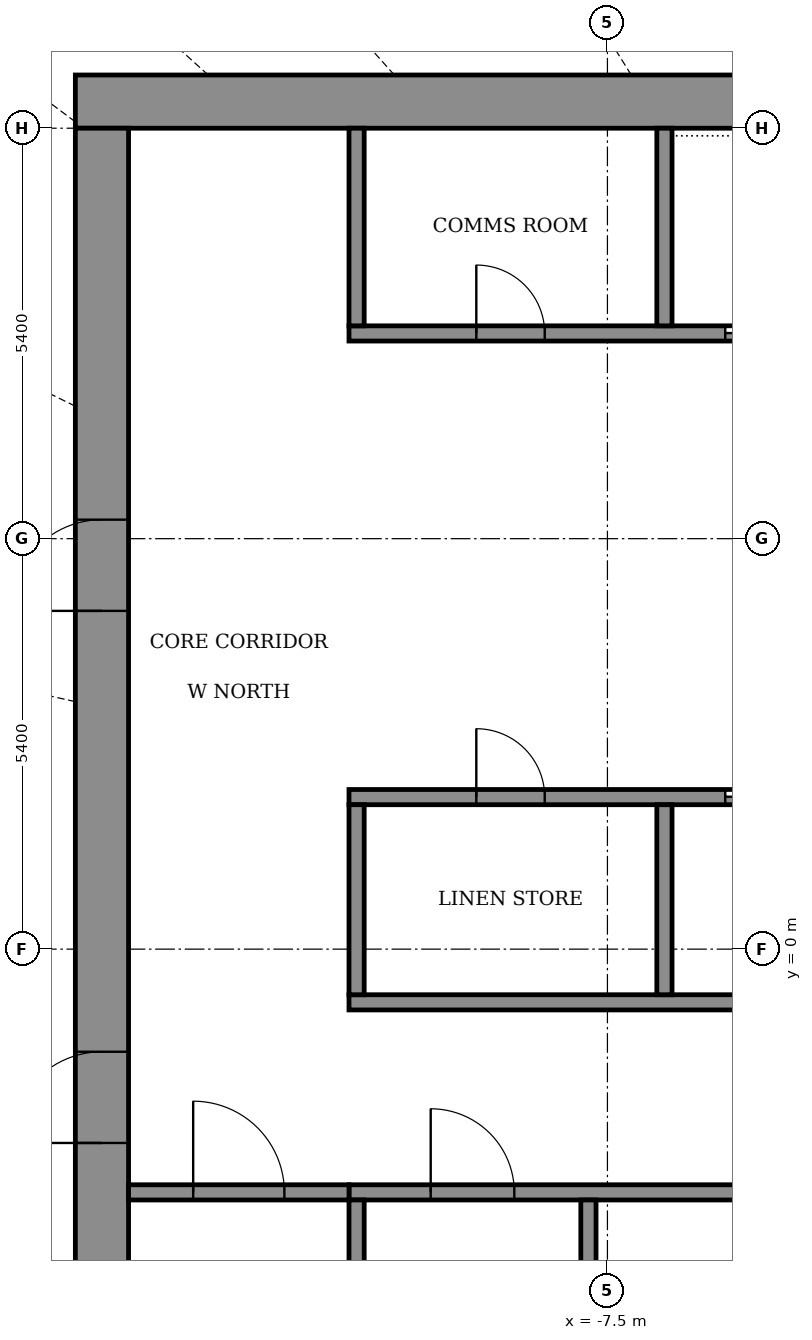
"""IFC4 building model, lengths in metres.
Left out: names, types, materials, properties, quantities, classifications, styles, units other than length and angle.
Written with IfcOpenShell. Run it as: python <this file> out.ifc"""

import sys

from ifc_helpers import new_model, si_unit, direction, frame, frame_2d, origin, place, context, subcontext, project, spatial, rectangle, extrude, element, fill, save


model = new_model("IFC4")
c1 = context("Model", 3, precision=1e-05, world=origin(), true_north=direction((0.0, 1.0)))
c2 = subcontext(c1, "Body", "Model", "MODEL_VIEW")
j1 = project(units=[si_unit("LENGTHUNIT", "METRE"), si_unit("PLANEANGLEUNIT", "RADIAN")], contexts=[c1])
p1 = place(None, origin())
s1 = spatial("IfcSite", under=j1, at=p1, CompositionType="ELEMENT")
p2 = place(p1, origin())
s2 = spatial("IfcBuilding", under=s1, at=p2, CompositionType="ELEMENT")
p3 = place(p2, frame((0.0, 0.0, 252.7)))
s3 = spatial("IfcBuildingStorey", under=s2, at=p3, CompositionType="ELEMENT", Elevation=252.7)
p4 = place(p3, frame((-14.5, 11.15, 0.0), z_axis=(0.0, 0.0, 1.0), x_axis=(1.0, 0.0, 0.0)))
e1 = element("IfcWall", 1, at=p4, inside=s3, PredefinedType="SHEAR", context=c2, shape_type="SweptSolid", body=[
    extrude(rectangle(XDim=29.0, YDim=0.7, at=frame_2d((14.5, 0.0))), origin(), (0.0, 0.0, 1.0), 4.6),
])
p5 = place(p3, frame((-14.15, -10.8, 0.0), z_axis=(0.0, 0.0, 1.0), x_axis=(0.0, 1.0, 0.0)))
e2 = element("IfcWall", 2, at=p5, inside=s3, PredefinedType="SHEAR", context=c2, shape_type="SweptSolid", body=[
    extrude(rectangle(XDim=21.6, YDim=0.7, at=frame_2d((10.8, 0.0))), origin(), (0.0, 0.0, 1.0), 4.6),
])
p6 = place(p5, frame((8.25, 0.0, 0.0)))
e3 = element("IfcOpeningElement", 3, at=p6, cuts=e2, PredefinedType="OPENING", context=c2, shape_type="SweptSolid", body=[
    extrude(rectangle(XDim=1.2, YDim=2.1, at=frame_2d((0.6, 1.05))), frame((0.0, 0.36, 0.0), z_axis=(0.0, -1.0, 0.0), x_axis=(1.0, 0.0, 0.0)), (0.0, 0.0, 1.0), 0.72),
])
p7 = place(p5, frame((15.25, 0.0, 0.0)))
e4 = element("IfcOpeningElement", 4, at=p7, cuts=e2, PredefinedType="OPENING", context=c2, shape_type="SweptSolid", body=[
    extrude(rectangle(XDim=1.2, YDim=2.1, at=frame_2d((0.6, 1.05))), frame((0.0, 0.36, 0.0), z_axis=(0.0, -1.0, 0.0), x_axis=(1.0, 0.0, 0.0)), (0.0, 0.0, 1.0), 0.72),
])
p8 = place(p3, frame((-10.9, -3.2, 0.0), z_axis=(0.0, 0.0, 1.0), x_axis=(1.0, 0.0, 0.0)))
e5 = element("IfcWall", 5, at=p8, inside=s3, PredefinedType="SHEAR", context=c2, shape_type="SweptSolid", body=[
    extrude(rectangle(XDim=21.8, YDim=0.2, at=frame_2d((10.9, 0.0))), origin(), (0.0, 0.0, 1.0), 4.05),
])
p9 = place(p8, frame((1.075, 0.0, 0.0)))
e6 = element("IfcOpeningElement", 6, at=p9, cuts=e5, PredefinedType="OPENING", context=c2, shape_type="SweptSolid", body=[
    extrude(rectangle(XDim=1.1, YDim=2.1, at=frame_2d((0.55, 1.05))), frame((0.0, 0.11, 0.0), z_axis=(0.0, -1.0, 0.0), x_axis=(1.0, 0.0, 0.0)), (0.0, 0.0, 1.0), 0.22),
])
p10 = place(p8, frame((10.325, 0.0, 0.0)))
e7 = element("IfcOpeningElement", 7, at=p10, cuts=e5, PredefinedType="OPENING", context=c2, shape_type="SweptSolid", body=[
    extrude(rectangle(XDim=1.1, YDim=2.1, at=frame_2d((0.55, 1.05))), frame((0.0, 0.11, 0.0), z_axis=(0.0, -1.0, 0.0), x_axis=(1.0, 0.0, 0.0)), (0.0, 0.0, 1.0), 0.22),
])
p11 = place(p8, frame((19.625, 0.0, 0.0)))
e8 = element("IfcOpeningElement", 8, at=p11, cuts=e5, PredefinedType="OPENING", context=c2, shape_type="SweptSolid", body=[
    extrude(rectangle(XDim=1.1, YDim=2.1, at=frame_2d((0.55, 1.05))), frame((0.0, 0.11, 0.0), z_axis=(0.0, -1.0, 0.0), x_axis=(1.0, 0.0, 0.0)), (0.0, 0.0, 1.0), 0.22),
])
p12 = place(p8, frame((5.7, 0.0, 0.0)))
e9 = element("IfcOpeningElement", 9, at=p12, cuts=e5, PredefinedType="OPENING", context=c2, shape_type="SweptSolid", body=[
    extrude(rectangle(XDim=1.1, YDim=2.1, at=frame_2d((0.55, 1.05))), frame((0.0, 0.11, 0.0), z_axis=(0.0, -1.0, 0.0), x_axis=(1.0, 0.0, 0.0)), (0.0, 0.0, 1.0), 0.22),
])
p13 = place(p8, frame((14.975, 0.0, 0.0)))
e10 = element("IfcOpeningElement", 10, at=p13, cuts=e5, PredefinedType="OPENING", context=c2, shape_type="SweptSolid", body=[
    extrude(rectangle(XDim=1.1, YDim=2.1, at=frame_2d((0.55, 1.05))), frame((0.0, 0.11, 0.0), z_axis=(0.0, -1.0, 0.0), x_axis=(1.0, 0.0, 0.0)), (0.0, 0.0, 1.0), 0.22),
])
p14 = place(p3, frame((-10.9, -0.7, 0.0), z_axis=(0.0, 0.0, 1.0), x_axis=(1.0, 0.0, 0.0)))
e11 = element("IfcWall", 11, at=p14, inside=s3, PredefinedType="SHEAR", context=c2, shape_type="SweptSolid", body=[
    extrude(rectangle(XDim=21.8, YDim=0.2, at=frame_2d((10.9, 0.0))), origin(), (0.0, 0.0, 1.0), 4.05),
])
p15 = place(p3, frame((-10.9, 2.0, 0.0), z_axis=(0.0, 0.0, 1.0), x_axis=(1.0, 0.0, 0.0)))
e12 = element("IfcWall", 12, at=p15, inside=s3, PredefinedType="SHEAR", context=c2, shape_type="SweptSolid", body=[
    extrude(rectangle(XDim=21.8, YDim=0.2, at=frame_2d((10.9, 0.0))), origin(), (0.0, 0.0, 1.0), 4.05),
])
p16 = place(p15, frame((4.95, 0.0, 0.0)))
e13 = element("IfcOpeningElement", 13, at=p16, cuts=e12, PredefinedType="OPENING", context=c2, shape_type="SweptSolid", body=[
    extrude(rectangle(XDim=1.1, YDim=2.1, at=frame_2d((0.55, 1.05))), frame((0.0, 0.11, 0.0), z_axis=(0.0, -1.0, 0.0), x_axis=(1.0, 0.0, 0.0)), (0.0, 0.0, 1.0), 0.22),
])
p17 = place(p15, frame((7.65, 0.0, 0.0)))
e14 = element("IfcOpeningElement", 14, at=p17, cuts=e12, PredefinedType="OPENING", context=c2, shape_type="SweptSolid", body=[
    extrude(rectangle(XDim=1.1, YDim=2.1, at=frame_2d((0.55, 1.05))), frame((0.0, 0.11, 0.0), z_axis=(0.0, -1.0, 0.0), x_axis=(1.0, 0.0, 0.0)), (0.0, 0.0, 1.0), 0.22),
])
p18 = place(p15, frame((10.35, 0.0, 0.0)))
e15 = element("IfcOpeningElement", 15, at=p18, cuts=e12, PredefinedType="OPENING", context=c2, shape_type="SweptSolid", body=[
    extrude(rectangle(XDim=1.1, YDim=2.1, at=frame_2d((0.55, 1.05))), frame((0.0, 0.11, 0.0), z_axis=(0.0, -1.0, 0.0), x_axis=(1.0, 0.0, 0.0)), (0.0, 0.0, 1.0), 0.22),
])
p19 = place(p15, frame((1.675, 0.0, 0.0)))
e16 = element("IfcOpeningElement", 16, at=p19, cuts=e12, PredefinedType="OPENING", context=c2, shape_type="SweptSolid", body=[
    extrude(rectangle(XDim=0.9, YDim=2.1, at=frame_2d((0.45, 1.05))), frame((0.0, 0.11, 0.0), z_axis=(0.0, -1.0, 0.0), x_axis=(1.0, 0.0, 0.0)), (0.0, 0.0, 1.0), 0.22),
])
p20 = place(p15, frame((16.525, 0.0, 0.0)))
e17 = element("IfcOpeningElement", 17, at=p20, cuts=e12, PredefinedType="OPENING", context=c2, shape_type="SweptSolid", body=[
    extrude(rectangle(XDim=0.9, YDim=2.1, at=frame_2d((0.45, 1.05))), frame((0.0, 0.11, 0.0), z_axis=(0.0, -1.0, 0.0), x_axis=(1.0, 0.0, 0.0)), (0.0, 0.0, 1.0), 0.22),
])
p21 = place(p3, frame((-10.9, 8.1, 0.0), z_axis=(0.0, 0.0, 1.0), x_axis=(1.0, 0.0, 0.0)))
e18 = element("IfcWall", 18, at=p21, inside=s3, PredefinedType="SHEAR", context=c2, shape_type="SweptSolid", body=[
    extrude(rectangle(XDim=21.8, YDim=0.2, at=frame_2d((10.9, 0.0))), origin(), (0.0, 0.0, 1.0), 4.05),
])
p22 = place(p21, frame((4.95, 0.0, 0.0)))
e19 = element("IfcOpeningElement", 19, at=p22, cuts=e18, PredefinedType="OPENING", context=c2, shape_type="SweptSolid", body=[
    extrude(rectangle(XDim=1.1, YDim=2.1, at=frame_2d((0.55, 1.05))), frame((0.0, 0.11, 0.0), z_axis=(0.0, -1.0, 0.0), x_axis=(1.0, 0.0, 0.0)), (0.0, 0.0, 1.0), 0.22),
])
p23 = place(p21, frame((7.65, 0.0, 0.0)))
e20 = element("IfcOpeningElement", 20, at=p23, cuts=e18, PredefinedType="OPENING", context=c2, shape_type="SweptSolid", body=[
    extrude(rectangle(XDim=1.1, YDim=2.1, at=frame_2d((0.55, 1.05))), frame((0.0, 0.11, 0.0), z_axis=(0.0, -1.0, 0.0), x_axis=(1.0, 0.0, 0.0)), (0.0, 0.0, 1.0), 0.22),
])
p24 = place(p21, frame((10.35, 0.0, 0.0)))
e21 = element("IfcOpeningElement", 21, at=p24, cuts=e18, PredefinedType="OPENING", context=c2, shape_type="SweptSolid", body=[
    extrude(rectangle(XDim=1.1, YDim=2.1, at=frame_2d((0.55, 1.05))), frame((0.0, 0.11, 0.0), z_axis=(0.0, -1.0, 0.0), x_axis=(1.0, 0.0, 0.0)), (0.0, 0.0, 1.0), 0.22),
])
p25 = place(p21, frame((1.675, 0.0, 0.0)))
e22 = element("IfcOpeningElement", 22, at=p25, cuts=e18, PredefinedType="OPENING", context=c2, shape_type="SweptSolid", body=[
    extrude(rectangle(XDim=0.9, YDim=2.1, at=frame_2d((0.45, 1.05))), frame((0.0, 0.11, 0.0), z_axis=(0.0, -1.0, 0.0), x_axis=(1.0, 0.0, 0.0)), (0.0, 0.0, 1.0), 0.22),
])
p26 = place(p21, frame((16.525, 0.0, 0.0)))
e23 = element("IfcOpeningElement", 23, at=p26, cuts=e18, PredefinedType="OPENING", context=c2, shape_type="SweptSolid", body=[
    extrude(rectangle(XDim=0.9, YDim=2.1, at=frame_2d((0.45, 1.05))), frame((0.0, 0.11, 0.0), z_axis=(0.0, -1.0, 0.0), x_axis=(1.0, 0.0, 0.0)), (0.0, 0.0, 1.0), 0.22),
])
for number, where, z_axis, x_axis in (
    (24, (-10.8, -10.8, 0.0), (0.0, 0.0, 1.0), (0.0, 1.0, 0.0)),
    (25, (-7.75, -10.8, 0.0), (0.0, 0.0, 1.0), (0.0, 1.0, 0.0)),
):
    element("IfcWall", number, at=place(p3, frame(where, z_axis=z_axis, x_axis=x_axis)), inside=s3, PredefinedType="SHEAR", context=c2, shape_type="SweptSolid", body=[
        extrude(rectangle(XDim=7.5, YDim=0.2, at=frame_2d((3.75, 0.0))), origin(), (0.0, 0.0, 1.0), 4.05),
    ])
p27 = place(p3, frame((-10.8, -0.6, 0.0), z_axis=(0.0, 0.0, 1.0), x_axis=(0.0, 1.0, 0.0)))
e26 = element("IfcWall", 26, at=p27, inside=s3, PredefinedType="STANDARD", context=c2, shape_type="SweptSolid", body=[
    extrude(rectangle(XDim=2.5, YDim=0.2, at=frame_2d((1.25, 0.0))), origin(), (0.0, 0.0, 1.0), 4.05),
])
p28 = place(p3, frame((-6.75, -0.6, 0.0), z_axis=(0.0, 0.0, 1.0), x_axis=(0.0, 1.0, 0.0)))
e27 = element("IfcWall", 27, at=p28, inside=s3, PredefinedType="SHEAR", context=c2, shape_type="SweptSolid", body=[
    extrude(rectangle(XDim=2.5, YDim=0.2, at=frame_2d((1.25, 0.0))), origin(), (0.0, 0.0, 1.0), 4.05),
])
p29 = place(p3, frame((-10.8, 8.2, 0.0), z_axis=(0.0, 0.0, 1.0), x_axis=(0.0, 1.0, 0.0)))
e28 = element("IfcWall", 28, at=p29, inside=s3, PredefinedType="STANDARD", context=c2, shape_type="SweptSolid", body=[
    extrude(rectangle(XDim=2.6, YDim=0.2, at=frame_2d((1.3, 0.0))), origin(), (0.0, 0.0, 1.0), 4.05),
])
p30 = place(p3, frame((-6.75, 8.2, 0.0), z_axis=(0.0, 0.0, 1.0), x_axis=(0.0, 1.0, 0.0)))
e29 = element("IfcWall", 29, at=p30, inside=s3, PredefinedType="SHEAR", context=c2, shape_type="SweptSolid", body=[
    extrude(rectangle(XDim=2.6, YDim=0.2, at=frame_2d((1.3, 0.0))), origin(), (0.0, 0.0, 1.0), 4.05),
])
p31 = place(p3, frame((-13.8, -3.2, 0.0), z_axis=(0.0, 0.0, 1.0), x_axis=(1.0, 0.0, 0.0)))
e30 = element("IfcWall", 30, at=p31, inside=s3, PredefinedType="STANDARD", context=c2, shape_type="SweptSolid", body=[
    extrude(rectangle(XDim=2.9, YDim=0.2, at=frame_2d((1.45, 0.0))), origin(), (0.0, 0.0, 1.0), 4.05),
])
p32 = place(p31, frame((0.85, 0.0, 0.0)))
e31 = element("IfcOpeningElement", 31, at=p32, cuts=e30, PredefinedType="OPENING", context=c2, shape_type="SweptSolid", body=[
    extrude(rectangle(XDim=1.2, YDim=2.1, at=frame_2d((0.6, 1.05))), frame((0.0, 0.11, 0.0), z_axis=(0.0, -1.0, 0.0), x_axis=(1.0, 0.0, 0.0)), (0.0, 0.0, 1.0), 0.22),
])
p33 = place(p6, origin())
e32 = element("IfcDoor", 32, at=p33, inside=s3, OperationType="DOUBLE_DOOR_SINGLE_SWING", PredefinedType="DOOR", context=c2, shape_type="SweptSolid", body=[
    extrude(rectangle(XDim=1.2, YDim=2.1, at=frame_2d((0.6, 1.05))), frame((0.0, 0.025, 0.0), z_axis=(0.0, -1.0, 0.0), x_axis=(1.0, 0.0, 0.0)), (0.0, 0.0, 1.0), 0.05),
])
fill(e3, e32)
p34 = place(p7, origin())
e33 = element("IfcDoor", 33, at=p34, inside=s3, OperationType="DOUBLE_DOOR_SINGLE_SWING", PredefinedType="DOOR", context=c2, shape_type="SweptSolid", body=[
    extrude(rectangle(XDim=1.2, YDim=2.1, at=frame_2d((0.6, 1.05))), frame((0.0, 0.025, 0.0), z_axis=(0.0, -1.0, 0.0), x_axis=(1.0, 0.0, 0.0)), (0.0, 0.0, 1.0), 0.05),
])
fill(e4, e33)
p35 = place(p16, origin())
e34 = element("IfcDoor", 34, at=p35, inside=s3, OperationType="SLIDING_TO_LEFT", PredefinedType="DOOR", context=c2, shape_type="SweptSolid", body=[
    extrude(rectangle(XDim=1.1, YDim=2.1, at=frame_2d((0.55, 1.05))), frame((0.0, 0.025, 0.0), z_axis=(0.0, -1.0, 0.0), x_axis=(1.0, 0.0, 0.0)), (0.0, 0.0, 1.0), 0.05),
])
fill(e13, e34)
p36 = place(p22, origin())
e35 = element("IfcDoor", 35, at=p36, inside=s3, OperationType="SLIDING_TO_LEFT", PredefinedType="DOOR", context=c2, shape_type="SweptSolid", body=[
    extrude(rectangle(XDim=1.1, YDim=2.1, at=frame_2d((0.55, 1.05))), frame((0.0, 0.025, 0.0), z_axis=(0.0, -1.0, 0.0), x_axis=(1.0, 0.0, 0.0)), (0.0, 0.0, 1.0), 0.05),
])
fill(e19, e35)
p37 = place(p19, origin())
e36 = element("IfcDoor", 36, at=p37, inside=s3, OperationType="SINGLE_SWING_RIGHT", PredefinedType="DOOR", context=c2, shape_type="SweptSolid", body=[
    extrude(rectangle(XDim=0.9, YDim=2.1, at=frame_2d((0.45, 1.05))), frame((0.0, 0.025, 0.0), z_axis=(0.0, -1.0, 0.0), x_axis=(1.0, 0.0, 0.0)), (0.0, 0.0, 1.0), 0.05),
])
fill(e16, e36)
p38 = place(p25, origin())
e37 = element("IfcDoor", 37, at=p38, inside=s3, OperationType="SINGLE_SWING_LEFT", PredefinedType="DOOR", context=c2, shape_type="SweptSolid", body=[
    extrude(rectangle(XDim=0.9, YDim=2.1, at=frame_2d((0.45, 1.05))), frame((0.0, 0.025, 0.0), z_axis=(0.0, -1.0, 0.0), x_axis=(1.0, 0.0, 0.0)), (0.0, 0.0, 1.0), 0.05),
])
fill(e22, e37)
p39 = place(p9, origin())
e38 = element("IfcDoor", 38, at=p39, inside=s3, OperationType="SINGLE_SWING_RIGHT", PredefinedType="DOOR", context=c2, shape_type="SweptSolid", body=[
    extrude(rectangle(XDim=1.1, YDim=2.1, at=frame_2d((0.55, 1.05))), frame((0.0, 0.025, 0.0), z_axis=(0.0, -1.0, 0.0), x_axis=(1.0, 0.0, 0.0)), (0.0, 0.0, 1.0), 0.05),
])
fill(e6, e38)
p40 = place(p32, origin())
e39 = element("IfcDoor", 39, at=p40, inside=s3, OperationType="SINGLE_SWING_LEFT", PredefinedType="DOOR", context=c2, shape_type="SweptSolid", body=[
    extrude(rectangle(XDim=1.2, YDim=2.1, at=frame_2d((0.6, 1.05))), frame((0.0, 0.025, 0.0), z_axis=(0.0, -1.0, 0.0), x_axis=(1.0, 0.0, 0.0)), (0.0, 0.0, 1.0), 0.05),
])
fill(e31, e39)
save(model, sys.argv[1])
